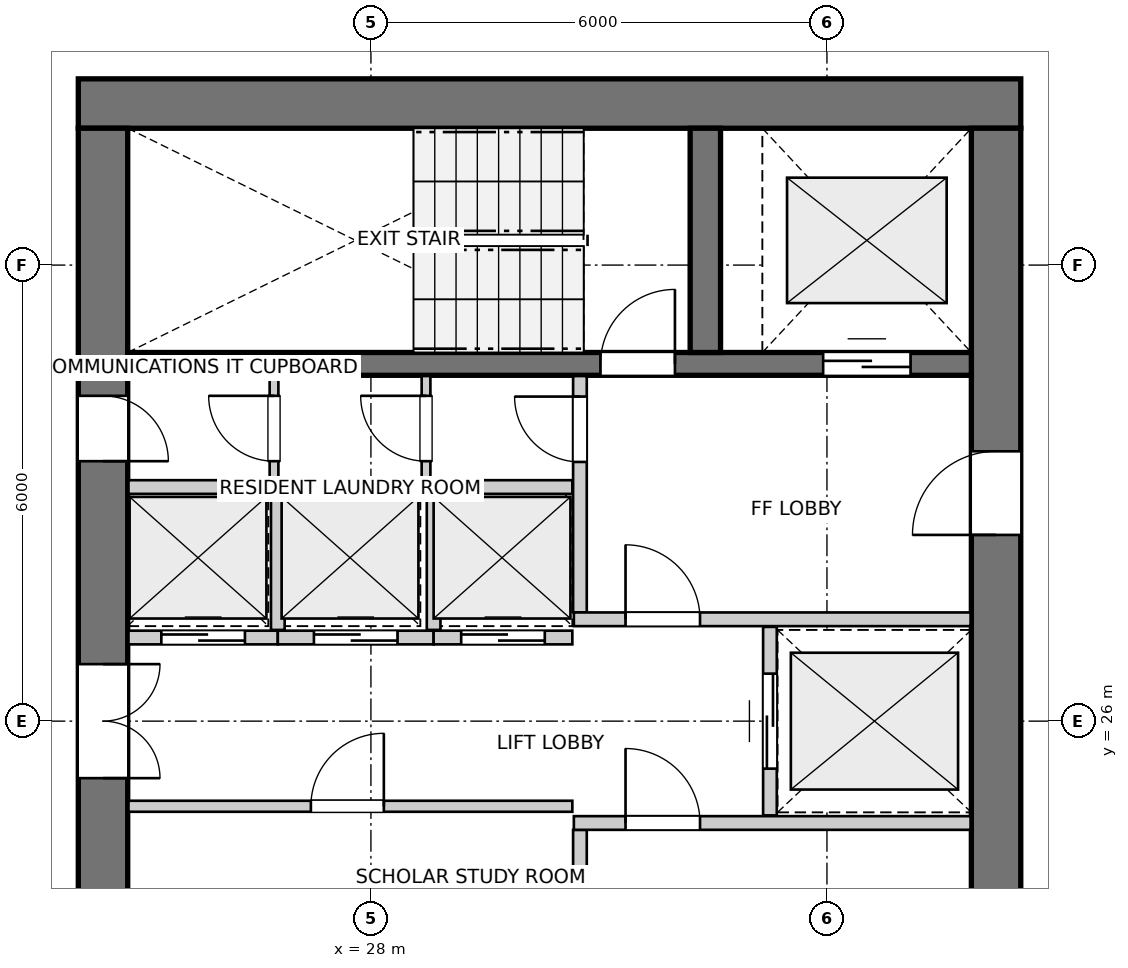
"""IFC4 building model, lengths in metres.
Left out: names, types, materials, properties, quantities, classifications, styles, units other than length and angle.
Written with IfcOpenShell. Run it as: python <this file> out.ifc"""

import sys

from ifc_helpers import new_model, si_unit, direction, frame, frame_2d, origin, place, context, subcontext, project, spatial, rectangle, extrude, source, transform, mapped, element, fill, save


model = new_model("IFC4")
c1 = context("Model", 3, precision=1e-05, world=origin(), true_north=direction((0.0, 1.0)))
c2 = subcontext(c1, "Body", "Model", "MODEL_VIEW")
j1 = project(units=[si_unit("LENGTHUNIT", "METRE"), si_unit("PLANEANGLEUNIT", "RADIAN")], contexts=[c1])
p1 = place(None, origin())
s1 = spatial("IfcSite", under=j1, at=p1, CompositionType="ELEMENT")
p2 = place(p1, origin())
s2 = spatial("IfcBuilding", under=s1, at=p2, CompositionType="ELEMENT")
p3 = place(p2, frame((0.0, 0.0, 152.2)))
s3 = spatial("IfcBuildingStorey", under=s2, at=p3, CompositionType="ELEMENT", Elevation=152.2)
p4 = place(p3, frame((36.55, 34.125, 0.0), z_axis=(0.0, 0.0, 1.0), x_axis=(-1.0, 0.0, 0.0)))
e1 = element("IfcWall", 1, at=p4, inside=s3, PredefinedType="SHEAR", context=c2, shape_type="SweptSolid", body=[
    extrude(rectangle(XDim=12.4, YDim=0.65, at=frame_2d((6.2, 0.0))), origin(), (0.0, 0.0, 1.0), 2.935),
])
p5 = place(p3, frame((24.475, 33.8, 0.0), z_axis=(0.0, 0.0, 1.0), x_axis=(0.0, -1.0, 0.0)))
e2 = element("IfcWall", 2, at=p5, inside=s3, PredefinedType="SHEAR", context=c2, shape_type="SweptSolid", body=[
    extrude(rectangle(XDim=15.6, YDim=0.65, at=frame_2d((7.8, 0.0))), origin(), (0.0, 0.0, 1.0), 2.935),
])
p6 = place(p5, frame((7.05, 0.0, 0.0)))
e3 = element("IfcOpeningElement", 3, at=p6, cuts=e2, PredefinedType="OPENING", context=c2, shape_type="SweptSolid", body=[
    extrude(rectangle(XDim=1.5, YDim=2.15, at=frame_2d((0.75, 1.075))), frame((0.0, 0.335, 0.0), z_axis=(0.0, -1.0, 0.0), x_axis=(1.0, 0.0, 0.0)), (0.0, 0.0, 1.0), 0.67),
])
p7 = place(p5, frame((3.52, 0.0, 0.0)))
e4 = element("IfcOpeningElement", 4, at=p7, cuts=e2, PredefinedType="OPENING", context=c2, shape_type="SweptSolid", body=[
    extrude(rectangle(XDim=0.86, YDim=2.05, at=frame_2d((0.43, 1.025))), frame((0.0, 0.335, 0.0), z_axis=(0.0, -1.0, 0.0), x_axis=(1.0, 0.0, 0.0)), (0.0, 0.0, 1.0), 0.67),
])
p8 = place(p5, frame((11.22, 0.0, 0.0)))
e5 = element("IfcOpeningElement", 5, at=p8, cuts=e2, PredefinedType="OPENING", context=c2, shape_type="SweptSolid", body=[
    extrude(rectangle(XDim=0.86, YDim=2.05, at=frame_2d((0.43, 1.025))), frame((0.0, 0.335, 0.0), z_axis=(0.0, -1.0, 0.0), x_axis=(1.0, 0.0, 0.0)), (0.0, 0.0, 1.0), 0.67),
])
p9 = place(p3, frame((36.225, 18.2, 0.0), z_axis=(0.0, 0.0, 1.0), x_axis=(0.0, 1.0, 0.0)))
e6 = element("IfcWall", 6, at=p9, inside=s3, PredefinedType="SHEAR", context=c2, shape_type="SweptSolid", body=[
    extrude(rectangle(XDim=15.6, YDim=0.65, at=frame_2d((7.8, 0.0))), origin(), (0.0, 0.0, 1.0), 2.935),
])
p10 = place(p9, frame((4.25, 0.0, 0.0)))
e7 = element("IfcOpeningElement", 7, at=p10, cuts=e6, PredefinedType="OPENING", context=c2, shape_type="SweptSolid", body=[
    extrude(rectangle(XDim=1.1, YDim=2.15, at=frame_2d((0.55, 1.075))), frame((0.0, 0.335, 0.0), z_axis=(0.0, -1.0, 0.0), x_axis=(1.0, 0.0, 0.0)), (0.0, 0.0, 1.0), 0.67),
])
p11 = place(p9, frame((10.25, 0.0, 0.0)))
e8 = element("IfcOpeningElement", 8, at=p11, cuts=e6, PredefinedType="OPENING", context=c2, shape_type="SweptSolid", body=[
    extrude(rectangle(XDim=1.1, YDim=2.15, at=frame_2d((0.55, 1.075))), frame((0.0, 0.335, 0.0), z_axis=(0.0, -1.0, 0.0), x_axis=(1.0, 0.0, 0.0)), (0.0, 0.0, 1.0), 0.67),
])
p12 = place(p3, frame((24.8, 30.7, 0.0), z_axis=(0.0, 0.0, 1.0), x_axis=(1.0, 0.0, 0.0)))
e9 = element("IfcWall", 9, at=p12, inside=s3, PredefinedType="SHEAR", context=c2, shape_type="SweptSolid", body=[
    extrude(rectangle(XDim=11.1, YDim=0.3, at=frame_2d((5.55, 0.0))), origin(), (0.0, 0.0, 1.0), 2.935),
])
p13 = place(p12, frame((6.22, 0.0, 0.0)))
e10 = element("IfcOpeningElement", 10, at=p13, cuts=e9, PredefinedType="OPENING", context=c2, shape_type="SweptSolid", body=[
    extrude(rectangle(XDim=0.98, YDim=2.15, at=frame_2d((0.49, 1.075))), frame((0.0, 0.16, 0.0), z_axis=(0.0, -1.0, 0.0), x_axis=(1.0, 0.0, 0.0)), (0.0, 0.0, 1.0), 0.32),
])
p14 = place(p12, frame((9.15, 0.0, 0.0)))
e11 = element("IfcOpeningElement", 11, at=p14, cuts=e9, PredefinedType="OPENING", context=c2, shape_type="SweptSolid", body=[
    extrude(rectangle(XDim=1.15, YDim=2.15, at=frame_2d((0.575, 1.075))), frame((0.0, 0.16, 0.0), z_axis=(0.0, -1.0, 0.0), x_axis=(1.0, 0.0, 0.0)), (0.0, 0.0, 1.0), 0.32),
])
p15 = place(p3, frame((32.4, 30.85, 0.0), z_axis=(0.0, 0.0, 1.0), x_axis=(0.0, 1.0, 0.0)))
e12 = element("IfcWall", 12, at=p15, inside=s3, PredefinedType="SHEAR", context=c2, shape_type="SweptSolid", body=[
    extrude(rectangle(XDim=2.95, YDim=0.4, at=frame_2d((1.475, 0.0))), origin(), (0.0, 0.0, 1.0), 2.935),
])
p16 = place(p3, frame((30.75, 21.46, 0.0), z_axis=(0.0, 0.0, 1.0), x_axis=(0.0, 1.0, 0.0)))
e13 = element("IfcWall", 13, at=p16, inside=s3, PredefinedType="PARTITIONING", context=c2, shape_type="SweptSolid", body=[
    extrude(rectangle(XDim=3.11, YDim=0.18, at=frame_2d((1.555, 0.0))), origin(), (0.0, 0.0, 1.0), 2.935),
])
p17 = place(p16, frame((0.26, 0.0, 0.0)))
e14 = element("IfcOpeningElement", 14, at=p17, cuts=e13, PredefinedType="OPENING", context=c2, shape_type="SweptSolid", body=[
    extrude(rectangle(XDim=0.86, YDim=2.05, at=frame_2d((0.43, 1.025))), frame((0.0, 0.1, 0.0), z_axis=(0.0, -1.0, 0.0), x_axis=(1.0, 0.0, 0.0)), (0.0, 0.0, 1.0), 0.2),
])
p18 = place(p3, frame((30.67, 24.66, 0.0), z_axis=(0.0, 0.0, 1.0), x_axis=(1.0, 0.0, 0.0)))
e15 = element("IfcWall", 15, at=p18, inside=s3, PredefinedType="PARTITIONING", context=c2, shape_type="SweptSolid", body=[
    extrude(rectangle(XDim=5.22, YDim=0.18, at=frame_2d((2.61, 0.0))), origin(), (0.0, 0.0, 1.0), 2.935),
])
p19 = place(p18, frame((0.68, 0.0, 0.0)))
e16 = element("IfcOpeningElement", 16, at=p19, cuts=e15, PredefinedType="OPENING", context=c2, shape_type="SweptSolid", body=[
    extrude(rectangle(XDim=0.98, YDim=2.15, at=frame_2d((0.49, 1.075))), frame((0.0, 0.1, 0.0), z_axis=(0.0, -1.0, 0.0), x_axis=(1.0, 0.0, 0.0)), (0.0, 0.0, 1.0), 0.2),
])
p20 = place(p3, frame((30.75, 27.43, 0.0), z_axis=(0.0, 0.0, 1.0), x_axis=(0.0, 1.0, 0.0)))
e17 = element("IfcWall", 17, at=p20, inside=s3, PredefinedType="PARTITIONING", context=c2, shape_type="SweptSolid", body=[
    extrude(rectangle(XDim=3.11, YDim=0.18, at=frame_2d((1.555, 0.0))), origin(), (0.0, 0.0, 1.0), 2.935),
])
p21 = place(p20, frame((1.98, 0.0, 0.0)))
e18 = element("IfcOpeningElement", 18, at=p21, cuts=e17, PredefinedType="OPENING", context=c2, shape_type="SweptSolid", body=[
    extrude(rectangle(XDim=0.86, YDim=2.05, at=frame_2d((0.43, 1.025))), frame((0.0, 0.1, 0.0), z_axis=(0.0, -1.0, 0.0), x_axis=(1.0, 0.0, 0.0)), (0.0, 0.0, 1.0), 0.2),
])
p22 = place(p3, frame((30.67, 27.34, 0.0), z_axis=(0.0, 0.0, 1.0), x_axis=(1.0, 0.0, 0.0)))
e19 = element("IfcWall", 19, at=p22, inside=s3, PredefinedType="PARTITIONING", context=c2, shape_type="SweptSolid", body=[
    extrude(rectangle(XDim=5.22, YDim=0.18, at=frame_2d((2.61, 0.0))), origin(), (0.0, 0.0, 1.0), 2.935),
])
p23 = place(p22, frame((0.68, 0.0, 0.0)))
e20 = element("IfcOpeningElement", 20, at=p23, cuts=e19, PredefinedType="OPENING", context=c2, shape_type="SweptSolid", body=[
    extrude(rectangle(XDim=0.98, YDim=2.15, at=frame_2d((0.49, 1.075))), frame((0.0, 0.1, 0.0), z_axis=(0.0, -1.0, 0.0), x_axis=(1.0, 0.0, 0.0)), (0.0, 0.0, 1.0), 0.2),
])
p24 = place(p3, frame((33.25, 24.76, 0.0), z_axis=(0.0, 0.0, 1.0), x_axis=(0.0, 1.0, 0.0)))
e21 = element("IfcWall", 21, at=p24, inside=s3, PredefinedType="PARTITIONING", context=c2, shape_type="SweptSolid", body=[
    extrude(rectangle(XDim=2.48, YDim=0.18, at=frame_2d((1.24, 0.0))), origin(), (0.0, 0.0, 1.0), 2.935),
])
p25 = place(p24, frame((0.615, 0.0, 0.0)))
e22 = element("IfcOpeningElement", 22, at=p25, cuts=e21, PredefinedType="OPENING", context=c2, shape_type="SweptSolid", body=[
    extrude(rectangle(XDim=1.25, YDim=2.15, at=frame_2d((0.625, 1.075))), frame((0.0, 0.1, 0.0), z_axis=(0.0, -1.0, 0.0), x_axis=(1.0, 0.0, 0.0)), (0.0, 0.0, 1.0), 0.2),
])
p26 = place(p3, frame((24.81, 24.88, 0.0), z_axis=(0.0, 0.0, 1.0), x_axis=(1.0, 0.0, 0.0)))
e23 = element("IfcWall", 23, at=p26, inside=s3, PredefinedType="PARTITIONING", context=c2, shape_type="SweptSolid", body=[
    extrude(rectangle(XDim=5.84, YDim=0.145, at=frame_2d((2.92, 0.0))), origin(), (0.0, 0.0, 1.0), 2.935),
])
p27 = place(p26, frame((2.4, 0.0, 0.0)))
e24 = element("IfcOpeningElement", 24, at=p27, cuts=e23, PredefinedType="OPENING", context=c2, shape_type="SweptSolid", body=[
    extrude(rectangle(XDim=0.96, YDim=2.1, at=frame_2d((0.48, 1.05))), frame((0.0, 0.083, 0.0), z_axis=(0.0, -1.0, 0.0), x_axis=(1.0, 0.0, 0.0)), (0.0, 0.0, 1.0), 0.165),
])
p28 = place(p3, frame((24.81, 29.08, 0.0), z_axis=(0.0, 0.0, 1.0), x_axis=(1.0, 0.0, 0.0)))
e25 = element("IfcWall", 25, at=p28, inside=s3, PredefinedType="PARTITIONING", context=c2, shape_type="SweptSolid", body=[
    extrude(rectangle(XDim=5.84, YDim=0.18, at=frame_2d((2.92, 0.0))), origin(), (0.0, 0.0, 1.0), 2.935),
])
p29 = place(p3, frame((24.81, 27.1, 0.0), z_axis=(0.0, 0.0, 1.0), x_axis=(1.0, 0.0, 0.0)))
e26 = element("IfcWall", 26, at=p29, inside=s3, PredefinedType="PARTITIONING", context=c2, shape_type="SweptSolid", body=[
    extrude(rectangle(XDim=1.965, YDim=0.18, at=frame_2d((0.982, 0.0))), origin(), (0.0, 0.0, 1.0), 2.935),
])
p30 = place(p29, frame((0.433, 0.0, 0.0)))
e27 = element("IfcOpeningElement", 27, at=p30, cuts=e26, PredefinedType="OPENING", context=c2, shape_type="SweptSolid", body=[
    extrude(rectangle(XDim=1.1, YDim=2.15, at=frame_2d((0.55, 1.075))), frame((0.0, 0.1, 0.0), z_axis=(0.0, -1.0, 0.0), x_axis=(1.0, 0.0, 0.0)), (0.0, 0.0, 1.0), 0.2),
])
p31 = place(p3, frame((26.775, 27.1, 0.0), z_axis=(0.0, 0.0, 1.0), x_axis=(1.0, 0.0, 0.0)))
e28 = element("IfcWall", 28, at=p31, inside=s3, PredefinedType="PARTITIONING", context=c2, shape_type="SweptSolid", body=[
    extrude(rectangle(XDim=2.05, YDim=0.18, at=frame_2d((1.025, 0.0))), origin(), (0.0, 0.0, 1.0), 2.935),
])
p32 = place(p31, frame((0.475, 0.0, 0.0)))
e29 = element("IfcOpeningElement", 29, at=p32, cuts=e28, PredefinedType="OPENING", context=c2, shape_type="SweptSolid", body=[
    extrude(rectangle(XDim=1.1, YDim=2.15, at=frame_2d((0.55, 1.075))), frame((0.0, 0.1, 0.0), z_axis=(0.0, -1.0, 0.0), x_axis=(1.0, 0.0, 0.0)), (0.0, 0.0, 1.0), 0.2),
])
p33 = place(p3, frame((26.775, 27.2, 0.0), z_axis=(0.0, 0.0, 1.0), x_axis=(0.0, 1.0, 0.0)))
e30 = element("IfcWall", 30, at=p33, inside=s3, PredefinedType="PARTITIONING", context=c2, shape_type="SweptSolid", body=[
    extrude(rectangle(XDim=1.78, YDim=0.18, at=frame_2d((0.89, 0.0))), origin(), (0.0, 0.0, 1.0), 2.935),
])
p34 = place(p3, frame((28.825, 27.1, 0.0), z_axis=(0.0, 0.0, 1.0), x_axis=(1.0, 0.0, 0.0)))
e31 = element("IfcWall", 31, at=p34, inside=s3, PredefinedType="PARTITIONING", context=c2, shape_type="SweptSolid", body=[
    extrude(rectangle(XDim=1.825, YDim=0.18, at=frame_2d((0.913, 0.0))), origin(), (0.0, 0.0, 1.0), 2.935),
])
p35 = place(p34, frame((0.363, 0.0, 0.0)))
e32 = element("IfcOpeningElement", 32, at=p35, cuts=e31, PredefinedType="OPENING", context=c2, shape_type="SweptSolid", body=[
    extrude(rectangle(XDim=1.1, YDim=2.15, at=frame_2d((0.55, 1.075))), frame((0.0, 0.1, 0.0), z_axis=(0.0, -1.0, 0.0), x_axis=(1.0, 0.0, 0.0)), (0.0, 0.0, 1.0), 0.2),
])
p36 = place(p3, frame((28.825, 27.2, 0.0), z_axis=(0.0, 0.0, 1.0), x_axis=(0.0, 1.0, 0.0)))
e33 = element("IfcWall", 33, at=p36, inside=s3, PredefinedType="PARTITIONING", context=c2, shape_type="SweptSolid", body=[
    extrude(rectangle(XDim=1.78, YDim=0.18, at=frame_2d((0.89, 0.0))), origin(), (0.0, 0.0, 1.0), 2.935),
])
p37 = place(p3, frame((26.725, 29.16, 0.0), z_axis=(0.0, 0.0, 1.0), x_axis=(0.0, 1.0, 0.0)))
e34 = element("IfcWall", 34, at=p37, inside=s3, PredefinedType="PARTITIONING", context=c2, shape_type="SweptSolid", body=[
    extrude(rectangle(XDim=1.38, YDim=0.115, at=frame_2d((0.69, 0.0))), origin(), (0.0, 0.0, 1.0), 2.935),
])
p38 = place(p37, frame((0.26, 0.0, 0.0)))
e35 = element("IfcOpeningElement", 35, at=p38, cuts=e34, PredefinedType="OPENING", context=c2, shape_type="SweptSolid", body=[
    extrude(rectangle(XDim=0.86, YDim=2.05, at=frame_2d((0.43, 1.025))), frame((0.0, 0.067, 0.0), z_axis=(0.0, -1.0, 0.0), x_axis=(1.0, 0.0, 0.0)), (0.0, 0.0, 1.0), 0.135),
])
p39 = place(p3, frame((28.725, 29.16, 0.0), z_axis=(0.0, 0.0, 1.0), x_axis=(0.0, 1.0, 0.0)))
e36 = element("IfcWall", 36, at=p39, inside=s3, PredefinedType="PARTITIONING", context=c2, shape_type="SweptSolid", body=[
    extrude(rectangle(XDim=1.38, YDim=0.115, at=frame_2d((0.69, 0.0))), origin(), (0.0, 0.0, 1.0), 2.935),
])
p40 = place(p39, frame((0.26, 0.0, 0.0)))
e37 = element("IfcOpeningElement", 37, at=p40, cuts=e36, PredefinedType="OPENING", context=c2, shape_type="SweptSolid", body=[
    extrude(rectangle(XDim=0.86, YDim=2.05, at=frame_2d((0.43, 1.025))), frame((0.0, 0.067, 0.0), z_axis=(0.0, -1.0, 0.0), x_axis=(1.0, 0.0, 0.0)), (0.0, 0.0, 1.0), 0.135),
])
m1 = source(origin(), c2, "Body", "SweptSolid", [
    extrude(rectangle(XDim=0.98, YDim=2.15, at=frame_2d((0.49, 1.075))), frame((0.0, 0.025, 0.0), z_axis=(0.0, -1.0, 0.0), x_axis=(1.0, 0.0, 0.0)), (0.0, 0.0, 1.0), 0.05),
])
p41 = place(p13, origin())
e38 = element("IfcDoor", 38, at=p41, inside=s3, OperationType="SINGLE_SWING_RIGHT", PredefinedType="DOOR", context=c2, shape_type="MappedRepresentation", body=[
    mapped(m1, transform((0.0, 0.0, 0.0), x_axis=(1.0, 0.0, 0.0), y_axis=(0.0, 1.0, 0.0), z_axis=(0.0, 0.0, 1.0), scale=1.0)),
])
fill(e10, e38)
m2 = source(origin(), c2, "Body", "SweptSolid", [
    extrude(rectangle(XDim=1.15, YDim=2.15, at=frame_2d((0.575, 1.075))), frame((0.0, 0.025, 0.0), z_axis=(0.0, -1.0, 0.0), x_axis=(1.0, 0.0, 0.0)), (0.0, 0.0, 1.0), 0.05),
])
p42 = place(p14, origin())
e39 = element("IfcDoor", 39, at=p42, inside=s3, OperationType="DOUBLE_DOOR_SLIDING", PredefinedType="DOOR", context=c2, shape_type="MappedRepresentation", body=[
    mapped(m2, transform((0.0, 0.0, 0.0), x_axis=(1.0, 0.0, 0.0), y_axis=(0.0, 1.0, 0.0), z_axis=(0.0, 0.0, 1.0), scale=1.0)),
])
fill(e11, e39)
m3 = source(origin(), c2, "Body", "SweptSolid", [
    extrude(rectangle(XDim=1.1, YDim=2.15, at=frame_2d((0.55, 1.075))), frame((0.0, 0.025, 0.0), z_axis=(0.0, -1.0, 0.0), x_axis=(1.0, 0.0, 0.0)), (0.0, 0.0, 1.0), 0.05),
])
p43 = place(p11, origin())
e40 = element("IfcDoor", 40, at=p43, inside=s3, OperationType="SINGLE_SWING_LEFT", PredefinedType="DOOR", context=c2, shape_type="MappedRepresentation", body=[
    mapped(m3, transform((0.0, 0.0, 0.0), x_axis=(1.0, 0.0, 0.0), y_axis=(0.0, 1.0, 0.0), z_axis=(0.0, 0.0, 1.0), scale=1.0)),
])
fill(e8, e40)
m4 = source(origin(), c2, "Body", "SweptSolid", [
    extrude(rectangle(XDim=1.5, YDim=2.15, at=frame_2d((0.75, 1.075))), frame((0.0, 0.025, 0.0), z_axis=(0.0, -1.0, 0.0), x_axis=(1.0, 0.0, 0.0)), (0.0, 0.0, 1.0), 0.05),
])
p44 = place(p6, origin())
e41 = element("IfcDoor", 41, at=p44, inside=s3, OperationType="DOUBLE_DOOR_SINGLE_SWING", PredefinedType="DOOR", context=c2, shape_type="MappedRepresentation", body=[
    mapped(m4, transform((0.0, 0.0, 0.0), x_axis=(1.0, 0.0, 0.0), y_axis=(0.0, 1.0, 0.0), z_axis=(0.0, 0.0, 1.0), scale=1.0)),
])
fill(e3, e41)
m5 = source(origin(), c2, "Body", "SweptSolid", [
    extrude(rectangle(XDim=0.86, YDim=2.05, at=frame_2d((0.43, 1.025))), frame((0.0, 0.025, 0.0), z_axis=(0.0, -1.0, 0.0), x_axis=(1.0, 0.0, 0.0)), (0.0, 0.0, 1.0), 0.05),
])
p45 = place(p7, origin())
e42 = element("IfcDoor", 42, at=p45, inside=s3, OperationType="SINGLE_SWING_RIGHT", PredefinedType="DOOR", context=c2, shape_type="MappedRepresentation", body=[
    mapped(m5, transform((0.0, 0.0, 0.0), x_axis=(1.0, 0.0, 0.0), y_axis=(0.0, 1.0, 0.0), z_axis=(0.0, 0.0, 1.0), scale=1.0)),
])
fill(e4, e42)
p46 = place(p19, origin())
e43 = element("IfcDoor", 43, at=p46, inside=s3, OperationType="SINGLE_SWING_LEFT", PredefinedType="DOOR", context=c2, shape_type="MappedRepresentation", body=[
    mapped(m1, transform((0.0, 0.0, 0.0), x_axis=(1.0, 0.0, 0.0), y_axis=(0.0, 1.0, 0.0), z_axis=(0.0, 0.0, 1.0), scale=1.0)),
])
fill(e16, e43)
p47 = place(p21, origin())
e44 = element("IfcDoor", 44, at=p47, inside=s3, OperationType="SINGLE_SWING_RIGHT", PredefinedType="DOOR", context=c2, shape_type="MappedRepresentation", body=[
    mapped(m5, transform((0.0, 0.0, 0.0), x_axis=(1.0, 0.0, 0.0), y_axis=(0.0, 1.0, 0.0), z_axis=(0.0, 0.0, 1.0), scale=1.0)),
])
fill(e18, e44)
p48 = place(p23, origin())
e45 = element("IfcDoor", 45, at=p48, inside=s3, OperationType="SINGLE_SWING_LEFT", PredefinedType="DOOR", context=c2, shape_type="MappedRepresentation", body=[
    mapped(m1, transform((0.0, 0.0, 0.0), x_axis=(1.0, 0.0, 0.0), y_axis=(0.0, 1.0, 0.0), z_axis=(0.0, 0.0, 1.0), scale=1.0)),
])
fill(e20, e45)
m6 = source(origin(), c2, "Body", "SweptSolid", [
    extrude(rectangle(XDim=1.25, YDim=2.15, at=frame_2d((0.625, 1.075))), frame((0.0, 0.025, 0.0), z_axis=(0.0, -1.0, 0.0), x_axis=(1.0, 0.0, 0.0)), (0.0, 0.0, 1.0), 0.05),
])
p49 = place(p25, origin())
e46 = element("IfcDoor", 46, at=p49, inside=s3, OperationType="DOUBLE_DOOR_SLIDING", PredefinedType="DOOR", context=c2, shape_type="MappedRepresentation", body=[
    mapped(m6, transform((0.0, 0.0, 0.0), x_axis=(1.0, 0.0, 0.0), y_axis=(0.0, 1.0, 0.0), z_axis=(0.0, 0.0, 1.0), scale=1.0)),
])
fill(e22, e46)
m7 = source(origin(), c2, "Body", "SweptSolid", [
    extrude(rectangle(XDim=0.96, YDim=2.1, at=frame_2d((0.48, 1.05))), frame((0.0, 0.025, 0.0), z_axis=(0.0, -1.0, 0.0), x_axis=(1.0, 0.0, 0.0)), (0.0, 0.0, 1.0), 0.05),
])
p50 = place(p27, origin())
e47 = element("IfcDoor", 47, at=p50, inside=s3, OperationType="SINGLE_SWING_RIGHT", PredefinedType="DOOR", context=c2, shape_type="MappedRepresentation", body=[
    mapped(m7, transform((0.0, 0.0, 0.0), x_axis=(1.0, 0.0, 0.0), y_axis=(0.0, 1.0, 0.0), z_axis=(0.0, 0.0, 1.0), scale=1.0)),
])
fill(e24, e47)
p51 = place(p30, origin())
e48 = element("IfcDoor", 48, at=p51, inside=s3, OperationType="DOUBLE_DOOR_SLIDING", PredefinedType="DOOR", context=c2, shape_type="MappedRepresentation", body=[
    mapped(m3, transform((0.0, 0.0, 0.0), x_axis=(1.0, 0.0, 0.0), y_axis=(0.0, 1.0, 0.0), z_axis=(0.0, 0.0, 1.0), scale=1.0)),
])
fill(e27, e48)
p52 = place(p32, origin())
e49 = element("IfcDoor", 49, at=p52, inside=s3, OperationType="DOUBLE_DOOR_SLIDING", PredefinedType="DOOR", context=c2, shape_type="MappedRepresentation", body=[
    mapped(m3, transform((0.0, 0.0, 0.0), x_axis=(1.0, 0.0, 0.0), y_axis=(0.0, 1.0, 0.0), z_axis=(0.0, 0.0, 1.0), scale=1.0)),
])
fill(e29, e49)
p53 = place(p35, origin())
e50 = element("IfcDoor", 50, at=p53, inside=s3, OperationType="DOUBLE_DOOR_SLIDING", PredefinedType="DOOR", context=c2, shape_type="MappedRepresentation", body=[
    mapped(m3, transform((0.0, 0.0, 0.0), x_axis=(1.0, 0.0, 0.0), y_axis=(0.0, 1.0, 0.0), z_axis=(0.0, 0.0, 1.0), scale=1.0)),
])
fill(e32, e50)
p54 = place(p38, origin())
e51 = element("IfcDoor", 51, at=p54, inside=s3, OperationType="SINGLE_SWING_RIGHT", PredefinedType="DOOR", context=c2, shape_type="MappedRepresentation", body=[
    mapped(m5, transform((0.0, 0.0, 0.0), x_axis=(1.0, 0.0, 0.0), y_axis=(0.0, 1.0, 0.0), z_axis=(0.0, 0.0, 1.0), scale=1.0)),
])
fill(e35, e51)
p55 = place(p40, origin())
e52 = element("IfcDoor", 52, at=p55, inside=s3, OperationType="SINGLE_SWING_RIGHT", PredefinedType="DOOR", context=c2, shape_type="MappedRepresentation", body=[
    mapped(m5, transform((0.0, 0.0, 0.0), x_axis=(1.0, 0.0, 0.0), y_axis=(0.0, 1.0, 0.0), z_axis=(0.0, 0.0, 1.0), scale=1.0)),
])
fill(e37, e52)
save(model, sys.argv[1])
